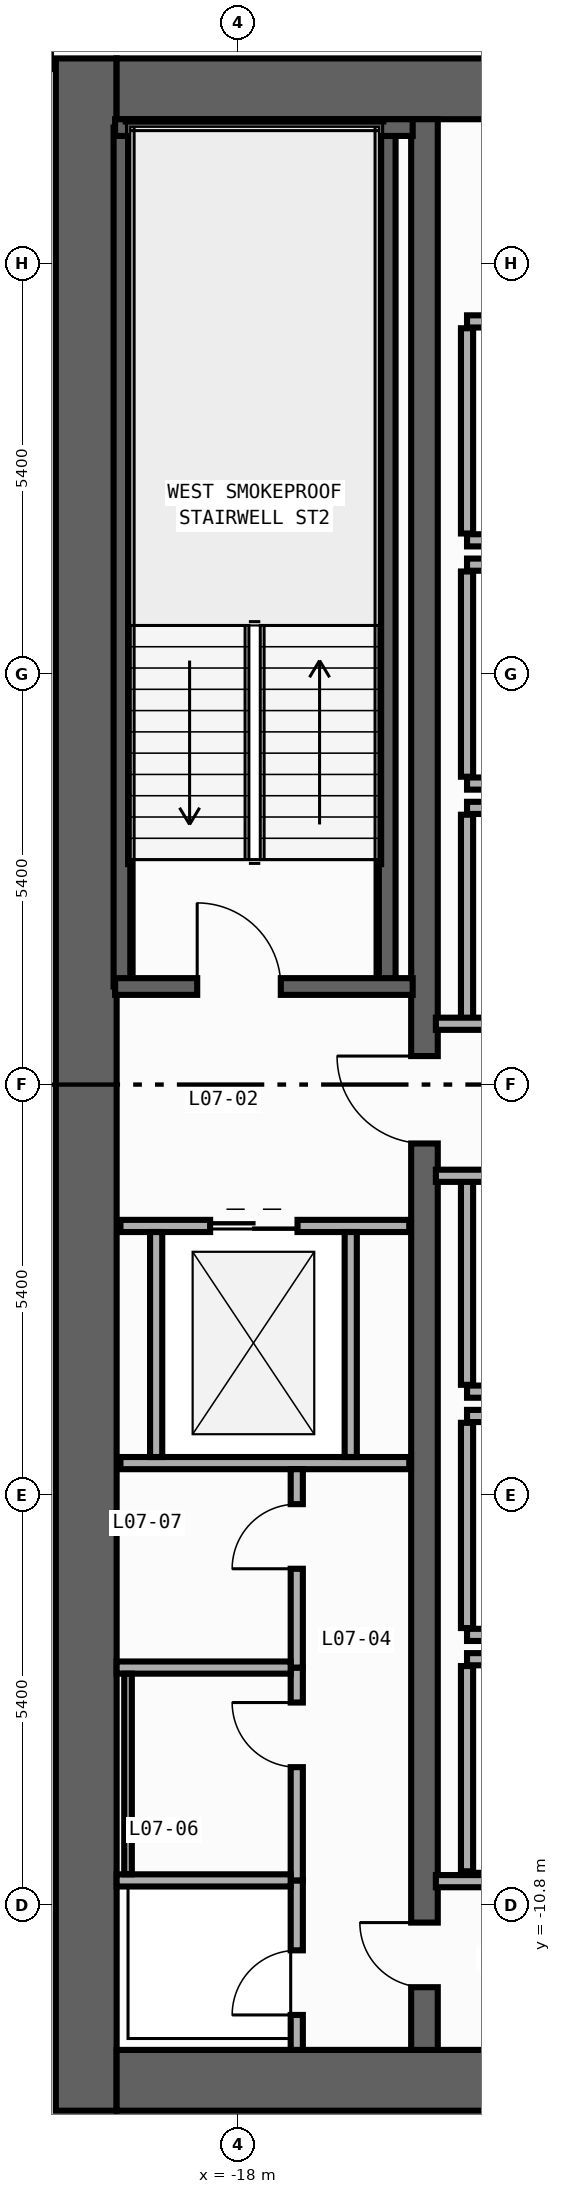
"""IFC4 building model, lengths in metres.
Left out: names, types, materials, properties, quantities, classifications, styles, units other than length and angle.
Written with IfcOpenShell. Run it as: python <this file> out.ifc"""

import sys

from ifc_helpers import new_model, si_unit, direction, frame, frame_2d, origin, place, context, subcontext, project, spatial, rectangle, extrude, element, fill, save


model = new_model("IFC4")
c1 = context("Model", 3, precision=1e-05, world=origin(), true_north=direction((0.0, 1.0)))
c2 = subcontext(c1, "Body", "Model", "MODEL_VIEW")
j1 = project(units=[si_unit("LENGTHUNIT", "METRE"), si_unit("PLANEANGLEUNIT", "RADIAN")], contexts=[c1])
p1 = place(None, origin())
s1 = spatial("IfcSite", under=j1, at=p1, CompositionType="ELEMENT")
p2 = place(p1, origin())
s2 = spatial("IfcBuilding", under=s1, at=p2, CompositionType="ELEMENT")
p3 = place(p2, frame((0.0, 0.0, 30.2)))
s3 = spatial("IfcBuildingStorey", under=s2, at=p3, CompositionType="ELEMENT", Elevation=30.2)
p4 = place(p3, frame((-20.0, -13.5, 0.0), z_axis=(0.0, 0.0, 1.0), x_axis=(0.0, 1.0, 0.0)))
e1 = element("IfcWall", 1, at=p4, inside=s3, PredefinedType="SHEAR", context=c2, shape_type="SweptSolid", body=[
    extrude(rectangle(XDim=27.0, YDim=0.8, at=frame_2d((13.5, 0.0))), origin(), (0.0, 0.0, 1.0), 3.94),
])
for number, where, z_axis, x_axis in (
    (2, (-19.6, -13.1, 0.0), (0.0, 0.0, 1.0), (1.0, 0.0, 0.0)),
    (3, (-19.6, 13.1, 0.0), (0.0, 0.0, 1.0), (1.0, 0.0, 0.0)),
):
    element("IfcWall", number, at=place(p3, frame(where, z_axis=z_axis, x_axis=x_axis)), inside=s3, PredefinedType="SHEAR", context=c2, shape_type="SweptSolid", body=[
        extrude(rectangle(XDim=6.8, YDim=0.8, at=frame_2d((3.4, 0.0))), origin(), (0.0, 0.0, 1.0), 3.94),
    ])
p5 = place(p3, frame((-15.55, -12.7, 0.0), z_axis=(0.0, 0.0, 1.0), x_axis=(0.0, 1.0, 0.0)))
e4 = element("IfcWall", 4, at=p5, inside=s3, PredefinedType="SHEAR", context=c2, shape_type="SweptSolid", body=[
    extrude(rectangle(XDim=25.4, YDim=0.35, at=frame_2d((12.7, 0.0))), origin(), (0.0, 0.0, 1.0), 3.94),
])
p6 = place(p5, frame((11.925, 0.0, 0.0)))
e5 = element("IfcOpeningElement", 5, at=p6, cuts=e4, PredefinedType="OPENING", context=c2, shape_type="SweptSolid", body=[
    extrude(rectangle(XDim=1.15, YDim=2.2, at=frame_2d((0.575, 1.1))), frame((0.0, 0.185, 0.0), z_axis=(0.0, -1.0, 0.0), x_axis=(1.0, 0.0, 0.0)), (0.0, 0.0, 1.0), 0.37),
])
p7 = place(p5, frame((0.825, 0.0, 0.0)))
e6 = element("IfcOpeningElement", 6, at=p7, cuts=e4, PredefinedType="OPENING", context=c2, shape_type="SweptSolid", body=[
    extrude(rectangle(XDim=0.85, YDim=2.1, at=frame_2d((0.425, 1.05))), frame((0.0, 0.185, 0.0), z_axis=(0.0, -1.0, 0.0), x_axis=(1.0, 0.0, 0.0)), (0.0, 0.0, 1.0), 0.37),
])
for number, where, z_axis, x_axis in (
    (7, (-16.04, 1.29, 0.0), (0.0, 0.0, 1.0), (0.0, 1.0, 0.0)),
    (8, (-19.53, 1.29, 0.0), (0.0, 0.0, 1.0), (0.0, 1.0, 0.0)),
):
    element("IfcWall", number, at=place(p3, frame(where, z_axis=z_axis, x_axis=x_axis)), inside=s3, PredefinedType="SHEAR", context=c2, shape_type="SweptSolid", body=[
        extrude(rectangle(XDim=11.3, YDim=0.22, at=frame_2d((5.65, 0.0))), origin(), (0.0, 0.0, 1.0), 3.94),
    ])
p8 = place(p3, frame((-19.62, 12.59, 0.0), z_axis=(0.0, 0.0, 1.0), x_axis=(1.0, 0.0, 0.0)))
e9 = element("IfcWall", 9, at=p8, inside=s3, PredefinedType="SHEAR", context=c2, shape_type="SweptSolid", body=[
    extrude(rectangle(XDim=3.915, YDim=0.22, at=frame_2d((1.958, 0.0))), origin(), (0.0, 0.0, 1.0), 3.94),
])
p9 = place(p3, frame((-19.62, 1.29, 0.0), z_axis=(0.0, 0.0, 1.0), x_axis=(1.0, 0.0, 0.0)))
e10 = element("IfcWall", 10, at=p9, inside=s3, PredefinedType="SHEAR", context=c2, shape_type="SweptSolid", body=[
    extrude(rectangle(XDim=3.915, YDim=0.22, at=frame_2d((1.958, 0.0))), origin(), (0.0, 0.0, 1.0), 3.94),
])
p10 = place(p9, frame((1.08, 0.0, 0.0)))
e11 = element("IfcOpeningElement", 11, at=p10, cuts=e10, PredefinedType="OPENING", context=c2, shape_type="SweptSolid", body=[
    extrude(rectangle(XDim=1.1, YDim=2.2, at=frame_2d((0.55, 1.1))), frame((0.0, 0.12, 0.0), z_axis=(0.0, -1.0, 0.0), x_axis=(1.0, 0.0, 0.0)), (0.0, 0.0, 1.0), 0.24),
])
for number, where, z_axis, x_axis in (
    (12, (-14.99, 7.16, 0.0), (0.0, 0.0, 1.0), (1.0, 0.0, 0.0)),
    (13, (-14.99, 10.04, 0.0), (0.0, 0.0, 1.0), (1.0, 0.0, 0.0)),
):
    element("IfcWall", number, at=place(p3, frame(where, z_axis=z_axis, x_axis=x_axis)), inside=s3, PredefinedType="STANDARD", context=c2, shape_type="SweptSolid", body=[
        extrude(rectangle(XDim=2.19, YDim=0.16, at=frame_2d((1.095, 0.0))), origin(), (0.0, 0.0, 1.0), 3.94),
    ])
p11 = place(p3, frame((-14.99, 7.25, 0.0), z_axis=(0.0, 0.0, 1.0), x_axis=(0.0, 1.0, 0.0)))
e14 = element("IfcWall", 14, at=p11, inside=s3, PredefinedType="STANDARD", context=c2, shape_type="SweptSolid", body=[
    extrude(rectangle(XDim=2.7, YDim=0.16, at=frame_2d((1.35, 0.0))), origin(), (0.0, 0.0, 1.0), 3.94),
])
for number, where, z_axis, x_axis in (
    (15, (-14.99, 3.96, 0.0), (0.0, 0.0, 1.0), (1.0, 0.0, 0.0)),
    (16, (-14.99, 6.84, 0.0), (0.0, 0.0, 1.0), (1.0, 0.0, 0.0)),
):
    element("IfcWall", number, at=place(p3, frame(where, z_axis=z_axis, x_axis=x_axis)), inside=s3, PredefinedType="STANDARD", context=c2, shape_type="SweptSolid", body=[
        extrude(rectangle(XDim=2.19, YDim=0.16, at=frame_2d((1.095, 0.0))), origin(), (0.0, 0.0, 1.0), 3.94),
    ])
p12 = place(p3, frame((-14.99, 4.05, 0.0), z_axis=(0.0, 0.0, 1.0), x_axis=(0.0, 1.0, 0.0)))
e17 = element("IfcWall", 17, at=p12, inside=s3, PredefinedType="STANDARD", context=c2, shape_type="SweptSolid", body=[
    extrude(rectangle(XDim=2.7, YDim=0.16, at=frame_2d((1.35, 0.0))), origin(), (0.0, 0.0, 1.0), 3.94),
])
p13 = place(p3, frame((-14.99, 3.64, 0.0), z_axis=(0.0, 0.0, 1.0), x_axis=(1.0, 0.0, 0.0)))
e18 = element("IfcWall", 18, at=p13, inside=s3, PredefinedType="STANDARD", context=c2, shape_type="SweptSolid", body=[
    extrude(rectangle(XDim=2.19, YDim=0.16, at=frame_2d((1.095, 0.0))), origin(), (0.0, 0.0, 1.0), 3.94),
])
p14 = place(p3, frame((-14.99, 0.85, 0.0), z_axis=(0.0, 0.0, 1.0), x_axis=(0.0, 1.0, 0.0)))
e19 = element("IfcWall", 19, at=p14, inside=s3, PredefinedType="STANDARD", context=c2, shape_type="SweptSolid", body=[
    extrude(rectangle(XDim=2.7, YDim=0.16, at=frame_2d((1.35, 0.0))), origin(), (0.0, 0.0, 1.0), 3.94),
])
p15 = place(p3, frame((-14.99, -4.04, 0.0), z_axis=(0.0, 0.0, 1.0), x_axis=(1.0, 0.0, 0.0)))
e20 = element("IfcWall", 20, at=p15, inside=s3, PredefinedType="STANDARD", context=c2, shape_type="SweptSolid", body=[
    extrude(rectangle(XDim=2.19, YDim=0.16, at=frame_2d((1.095, 0.0))), origin(), (0.0, 0.0, 1.0), 3.94),
])
p16 = place(p3, frame((-14.99, -3.95, 0.0), z_axis=(0.0, 0.0, 1.0), x_axis=(0.0, 1.0, 0.0)))
e21 = element("IfcWall", 21, at=p16, inside=s3, PredefinedType="STANDARD", context=c2, shape_type="SweptSolid", body=[
    extrude(rectangle(XDim=2.7, YDim=0.16, at=frame_2d((1.35, 0.0))), origin(), (0.0, 0.0, 1.0), 3.94),
])
for number, where, z_axis, x_axis in (
    (22, (-14.99, -7.24, 0.0), (0.0, 0.0, 1.0), (1.0, 0.0, 0.0)),
    (23, (-14.99, -4.36, 0.0), (0.0, 0.0, 1.0), (1.0, 0.0, 0.0)),
):
    element("IfcWall", number, at=place(p3, frame(where, z_axis=z_axis, x_axis=x_axis)), inside=s3, PredefinedType="STANDARD", context=c2, shape_type="SweptSolid", body=[
        extrude(rectangle(XDim=2.19, YDim=0.16, at=frame_2d((1.095, 0.0))), origin(), (0.0, 0.0, 1.0), 3.94),
    ])
p17 = place(p3, frame((-14.99, -7.15, 0.0), z_axis=(0.0, 0.0, 1.0), x_axis=(0.0, 1.0, 0.0)))
e24 = element("IfcWall", 24, at=p17, inside=s3, PredefinedType="STANDARD", context=c2, shape_type="SweptSolid", body=[
    extrude(rectangle(XDim=2.7, YDim=0.16, at=frame_2d((1.35, 0.0))), origin(), (0.0, 0.0, 1.0), 3.94),
])
p18 = place(p3, frame((-14.99, -7.56, 0.0), z_axis=(0.0, 0.0, 1.0), x_axis=(1.0, 0.0, 0.0)))
e25 = element("IfcWall", 25, at=p18, inside=s3, PredefinedType="STANDARD", context=c2, shape_type="SweptSolid", body=[
    extrude(rectangle(XDim=2.19, YDim=0.16, at=frame_2d((1.095, 0.0))), origin(), (0.0, 0.0, 1.0), 3.94),
])
p19 = place(p3, frame((-14.99, -10.35, 0.0), z_axis=(0.0, 0.0, 1.0), x_axis=(0.0, 1.0, 0.0)))
e26 = element("IfcWall", 26, at=p19, inside=s3, PredefinedType="STANDARD", context=c2, shape_type="SweptSolid", body=[
    extrude(rectangle(XDim=2.7, YDim=0.16, at=frame_2d((1.35, 0.0))), origin(), (0.0, 0.0, 1.0), 3.94),
])
p20 = place(p3, frame((-19.55, -1.86, 0.0), z_axis=(0.0, 0.0, 1.0), x_axis=(1.0, 0.0, 0.0)))
e27 = element("IfcWall", 27, at=p20, inside=s3, PredefinedType="STANDARD", context=c2, shape_type="SweptSolid", body=[
    extrude(rectangle(XDim=3.8, YDim=0.16, at=frame_2d((1.9, 0.0))), origin(), (0.0, 0.0, 1.0), 3.94),
])
p21 = place(p20, frame((1.18, 0.0, 0.0)))
e28 = element("IfcOpeningElement", 28, at=p21, cuts=e27, PredefinedType="OPENING", context=c2, shape_type="SweptSolid", body=[
    extrude(rectangle(XDim=1.15, YDim=2.2, at=frame_2d((0.575, 1.1))), frame((0.0, 0.09, 0.0), z_axis=(0.0, -1.0, 0.0), x_axis=(1.0, 0.0, 0.0)), (0.0, 0.0, 1.0), 0.18),
])
p22 = place(p3, frame((-19.55, -4.98, 0.0), z_axis=(0.0, 0.0, 1.0), x_axis=(1.0, 0.0, 0.0)))
e29 = element("IfcWall", 29, at=p22, inside=s3, PredefinedType="STANDARD", context=c2, shape_type="SweptSolid", body=[
    extrude(rectangle(XDim=3.8, YDim=0.16, at=frame_2d((1.9, 0.0))), origin(), (0.0, 0.0, 1.0), 3.94),
])
for number, where, z_axis, x_axis in (
    (30, (-19.08, -4.9, 0.0), (0.0, 0.0, 1.0), (0.0, 1.0, 0.0)),
    (31, (-16.52, -4.9, 0.0), (0.0, 0.0, 1.0), (0.0, 1.0, 0.0)),
):
    element("IfcWall", number, at=place(p3, frame(where, z_axis=z_axis, x_axis=x_axis)), inside=s3, PredefinedType="STANDARD", context=c2, shape_type="SweptSolid", body=[
        extrude(rectangle(XDim=2.96, YDim=0.16, at=frame_2d((1.48, 0.0))), origin(), (0.0, 0.0, 1.0), 3.94),
    ])
for number, where, z_axis, x_axis in (
    (32, (-15.4, 0.8, 0.0), (0.0, 0.0, 1.0), (1.0, 0.0, 0.0)),
    (33, (-15.4, -1.2, 0.0), (0.0, 0.0, 1.0), (1.0, 0.0, 0.0)),
    (34, (-15.4, -10.48, 0.0), (0.0, 0.0, 1.0), (1.0, 0.0, 0.0)),
):
    element("IfcWall", number, at=place(p3, frame(where, z_axis=z_axis, x_axis=x_axis)), inside=s3, PredefinedType="STANDARD", context=c2, shape_type="SweptSolid", body=[
        extrude(rectangle(XDim=2.6, YDim=0.16, at=frame_2d((1.3, 0.0))), origin(), (0.0, 0.0, 1.0), 3.94),
    ])
p23 = place(p3, frame((-17.23, -12.7, 0.0), z_axis=(0.0, 0.0, 1.0), x_axis=(0.0, 1.0, 0.0)))
e35 = element("IfcWall", 35, at=p23, inside=s3, PredefinedType="PARTITIONING", context=c2, shape_type="SweptSolid", body=[
    extrude(rectangle(XDim=2.23, YDim=0.16, at=frame_2d((1.115, 0.0))), origin(), (0.0, 0.0, 1.0), 3.94),
])
p24 = place(p23, frame((0.46, 0.0, 0.0)))
e36 = element("IfcOpeningElement", 36, at=p24, cuts=e35, PredefinedType="OPENING", context=c2, shape_type="SweptSolid", body=[
    extrude(rectangle(XDim=0.85, YDim=2.1, at=frame_2d((0.425, 1.05))), frame((0.0, 0.09, 0.0), z_axis=(0.0, -1.0, 0.0), x_axis=(1.0, 0.0, 0.0)), (0.0, 0.0, 1.0), 0.18),
])
p25 = place(p3, frame((-17.23, -10.47, 0.0), z_axis=(0.0, 0.0, 1.0), x_axis=(0.0, 1.0, 0.0)))
e37 = element("IfcWall", 37, at=p25, inside=s3, PredefinedType="PARTITIONING", context=c2, shape_type="SweptSolid", body=[
    extrude(rectangle(XDim=2.8, YDim=0.16, at=frame_2d((1.4, 0.0))), origin(), (0.0, 0.0, 1.0), 3.94),
])
p26 = place(p25, frame((1.49, 0.0, 0.0)))
e38 = element("IfcOpeningElement", 38, at=p26, cuts=e37, PredefinedType="OPENING", context=c2, shape_type="SweptSolid", body=[
    extrude(rectangle(XDim=0.85, YDim=2.1, at=frame_2d((0.425, 1.05))), frame((0.0, 0.09, 0.0), z_axis=(0.0, -1.0, 0.0), x_axis=(1.0, 0.0, 0.0)), (0.0, 0.0, 1.0), 0.18),
])
p27 = place(p3, frame((-17.23, -7.67, 0.0), z_axis=(0.0, 0.0, 1.0), x_axis=(0.0, 1.0, 0.0)))
e39 = element("IfcWall", 39, at=p27, inside=s3, PredefinedType="PARTITIONING", context=c2, shape_type="SweptSolid", body=[
    extrude(rectangle(XDim=2.61, YDim=0.16, at=frame_2d((1.305, 0.0))), origin(), (0.0, 0.0, 1.0), 3.94),
])
p28 = place(p27, frame((1.3, 0.0, 0.0)))
e40 = element("IfcOpeningElement", 40, at=p28, cuts=e39, PredefinedType="OPENING", context=c2, shape_type="SweptSolid", body=[
    extrude(rectangle(XDim=0.85, YDim=2.1, at=frame_2d((0.425, 1.05))), frame((0.0, 0.09, 0.0), z_axis=(0.0, -1.0, 0.0), x_axis=(1.0, 0.0, 0.0)), (0.0, 0.0, 1.0), 0.18),
])
for number, where, z_axis, x_axis in (
    (41, (-19.6, -10.47, 0.0), (0.0, 0.0, 1.0), (1.0, 0.0, 0.0)),
    (42, (-19.6, -7.67, 0.0), (0.0, 0.0, 1.0), (1.0, 0.0, 0.0)),
):
    element("IfcWall", number, at=place(p3, frame(where, z_axis=z_axis, x_axis=x_axis)), inside=s3, PredefinedType="PARTITIONING", context=c2, shape_type="SweptSolid", body=[
        extrude(rectangle(XDim=2.29, YDim=0.16, at=frame_2d((1.145, 0.0))), origin(), (0.0, 0.0, 1.0), 3.94),
    ])
p29 = place(p3, frame((-19.45, -10.39, 0.0), z_axis=(0.0, 0.0, 1.0), x_axis=(0.0, 1.0, 0.0)))
e43 = element("IfcWall", 43, at=p29, inside=s3, PredefinedType="PARTITIONING", context=c2, shape_type="SweptSolid", body=[
    extrude(rectangle(XDim=2.64, YDim=0.1, at=frame_2d((1.32, 0.0))), origin(), (0.0, 0.0, 1.0), 3.94),
])
p30 = place(p10, origin())
e44 = element("IfcDoor", 44, at=p30, inside=s3, OperationType="SINGLE_SWING_LEFT", PredefinedType="DOOR", context=c2, shape_type="SweptSolid", body=[
    extrude(rectangle(XDim=1.1, YDim=2.2, at=frame_2d((0.55, 1.1))), frame((0.0, 0.025, 0.0), z_axis=(0.0, -1.0, 0.0), x_axis=(1.0, 0.0, 0.0)), (0.0, 0.0, 1.0), 0.05),
])
fill(e11, e44)
p31 = place(p6, origin())
e45 = element("IfcDoor", 45, at=p31, inside=s3, OperationType="SINGLE_SWING_RIGHT", PredefinedType="DOOR", context=c2, shape_type="SweptSolid", body=[
    extrude(rectangle(XDim=1.15, YDim=2.2, at=frame_2d((0.575, 1.1))), frame((0.0, 0.025, 0.0), z_axis=(0.0, -1.0, 0.0), x_axis=(1.0, 0.0, 0.0)), (0.0, 0.0, 1.0), 0.05),
])
fill(e5, e45)
p32 = place(p7, origin())
e46 = element("IfcDoor", 46, at=p32, inside=s3, OperationType="SINGLE_SWING_RIGHT", PredefinedType="DOOR", context=c2, shape_type="SweptSolid", body=[
    extrude(rectangle(XDim=0.85, YDim=2.1, at=frame_2d((0.425, 1.05))), frame((0.0, 0.025, 0.0), z_axis=(0.0, -1.0, 0.0), x_axis=(1.0, 0.0, 0.0)), (0.0, 0.0, 1.0), 0.05),
])
fill(e6, e46)
p33 = place(p21, origin())
e47 = element("IfcDoor", 47, at=p33, inside=s3, OperationType="DOUBLE_DOOR_SLIDING", PredefinedType="DOOR", context=c2, shape_type="SweptSolid", body=[
    extrude(rectangle(XDim=1.15, YDim=2.2, at=frame_2d((0.575, 1.1))), frame((0.0, 0.025, 0.0), z_axis=(0.0, -1.0, 0.0), x_axis=(1.0, 0.0, 0.0)), (0.0, 0.0, 1.0), 0.05),
])
fill(e28, e47)
p34 = place(p24, origin())
e48 = element("IfcDoor", 48, at=p34, inside=s3, OperationType="SINGLE_SWING_LEFT", PredefinedType="DOOR", context=c2, shape_type="SweptSolid", body=[
    extrude(rectangle(XDim=0.85, YDim=2.1, at=frame_2d((0.425, 1.05))), frame((0.0, 0.025, 0.0), z_axis=(0.0, -1.0, 0.0), x_axis=(1.0, 0.0, 0.0)), (0.0, 0.0, 1.0), 0.05),
])
fill(e36, e48)
p35 = place(p26, origin())
e49 = element("IfcDoor", 49, at=p35, inside=s3, OperationType="SINGLE_SWING_RIGHT", PredefinedType="DOOR", context=c2, shape_type="SweptSolid", body=[
    extrude(rectangle(XDim=0.85, YDim=2.1, at=frame_2d((0.425, 1.05))), frame((0.0, 0.025, 0.0), z_axis=(0.0, -1.0, 0.0), x_axis=(1.0, 0.0, 0.0)), (0.0, 0.0, 1.0), 0.05),
])
fill(e38, e49)
p36 = place(p28, origin())
e50 = element("IfcDoor", 50, at=p36, inside=s3, OperationType="SINGLE_SWING_LEFT", PredefinedType="DOOR", context=c2, shape_type="SweptSolid", body=[
    extrude(rectangle(XDim=0.85, YDim=2.1, at=frame_2d((0.425, 1.05))), frame((0.0, 0.025, 0.0), z_axis=(0.0, -1.0, 0.0), x_axis=(1.0, 0.0, 0.0)), (0.0, 0.0, 1.0), 0.05),
])
fill(e40, e50)
save(model, sys.argv[1])
